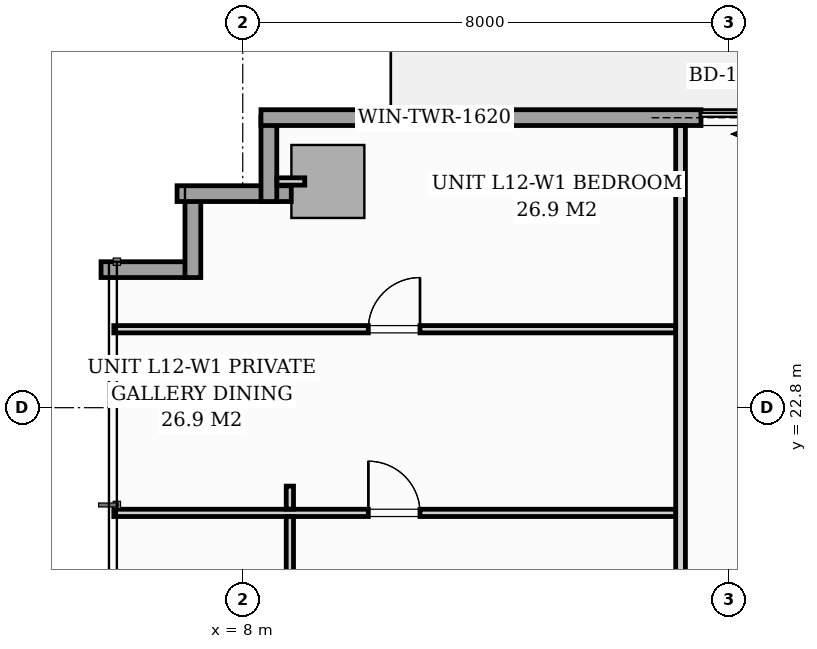
"""IFC4 building model, lengths in metres.
Left out: names, types, materials, properties, quantities, classifications, styles, units other than length and angle.
Written with IfcOpenShell. Run it as: python <this file> out.ifc"""

import sys

from ifc_helpers import new_model, si_unit, direction, frame, frame_2d, origin, origin_2d, place, context, subcontext, project, spatial, rectangle, extrude, source, transform, mapped, element, fill, save


model = new_model("IFC4")
c1 = context("Model", 3, precision=1e-05, world=origin(), true_north=direction((0.0, 1.0)))
c2 = subcontext(c1, "Body", "Model", "MODEL_VIEW")
j1 = project(units=[si_unit("LENGTHUNIT", "METRE"), si_unit("PLANEANGLEUNIT", "RADIAN")], contexts=[c1])
p1 = place(None, origin())
s1 = spatial("IfcSite", under=j1, at=p1, CompositionType="ELEMENT")
p2 = place(p1, origin())
s2 = spatial("IfcBuilding", under=s1, at=p2, CompositionType="ELEMENT")
p3 = place(p2, frame((0.0, 0.0, 45.4)))
s3 = spatial("IfcBuildingStorey", under=s2, at=p3, CompositionType="ELEMENT", Elevation=45.4)
m1 = source(origin(), c2, "Body", "SweptSolid", [
    extrude(rectangle(XDim=1.2, YDim=1.2, at=origin_2d()), origin(), (0.0, 0.0, 1.0), 3.196),
])
p4 = place(p3, frame((9.4, 26.52, 0.002), z_axis=(0.0, 0.0, 1.0), x_axis=(1.0, 0.0, 0.0)))
e1 = element("IfcColumn", 1, at=p4, inside=s3, PredefinedType="COLUMN", context=c2, shape_type="MappedRepresentation", body=[
    mapped(m1, transform((0.0, 0.0, 0.0), scale=1.0)),
])
for number, where, z_axis, x_axis in (
    (2, (5.67, 25.07, 0.0), (0.0, 0.0, 1.0), (1.0, 0.0, 0.0)),
    (3, (7.18, 24.94, 0.0), (0.0, 0.0, 1.0), (0.0, 1.0, 0.0)),
):
    element("IfcWall", number, at=place(p3, frame(where, z_axis=z_axis, x_axis=x_axis)), inside=s3, PredefinedType="STANDARD", context=c2, shape_type="SweptSolid", body=[
        extrude(rectangle(XDim=1.395, YDim=0.26, at=frame_2d((0.698, 0.0))), origin(), (0.0, 0.0, 1.0), 2.94),
    ])
p5 = place(p3, frame((6.92, 26.32, 0.0), z_axis=(0.0, 0.0, 1.0), x_axis=(1.0, 0.0, 0.0)))
e4 = element("IfcWall", 4, at=p5, inside=s3, PredefinedType="STANDARD", context=c2, shape_type="SweptSolid", body=[
    extrude(rectangle(XDim=1.878, YDim=0.26, at=frame_2d((0.939, 0.0))), origin(), (0.0, 0.0, 1.0), 2.94),
])
p6 = place(p3, frame((8.43, 26.19, 0.0), z_axis=(0.0, 0.0, 1.0), x_axis=(0.0, 1.0, 0.0)))
e5 = element("IfcWall", 5, at=p6, inside=s3, PredefinedType="STANDARD", context=c2, shape_type="SweptSolid", body=[
    extrude(rectangle(XDim=1.395, YDim=0.26, at=frame_2d((0.698, 0.0))), origin(), (0.0, 0.0, 1.0), 2.94),
])
p7 = place(p3, frame((8.3, 27.57, 0.0), z_axis=(0.0, 0.0, 1.0), x_axis=(1.0, 0.0, 0.0)))
e6 = element("IfcWall", 6, at=p7, inside=s3, PredefinedType="STANDARD", context=c2, shape_type="SweptSolid", body=[
    extrude(rectangle(XDim=17.15, YDim=0.26, at=frame_2d((8.575, 0.0))), origin(), (0.0, 0.0, 1.0), 2.94),
])
p8 = place(p7, frame((7.236, 0.0, 0.0)))
e7 = element("IfcOpeningElement", 7, at=p8, cuts=e6, PredefinedType="OPENING", context=c2, shape_type="SweptSolid", body=[
    extrude(rectangle(XDim=1.8, YDim=2.06, at=frame_2d((0.9, 1.03))), frame((0.0, 0.14, 0.0), z_axis=(0.0, -1.0, 0.0), x_axis=(1.0, 0.0, 0.0)), (0.0, 0.0, 1.0), 0.28),
])
p9 = place(p7, frame((2.05, 0.0, 0.65)))
e8 = element("IfcOpeningElement", 8, at=p9, cuts=e6, PredefinedType="OPENING", context=c2, shape_type="SweptSolid", body=[
    extrude(rectangle(XDim=1.6, YDim=1.5, at=frame_2d((0.8, 0.75))), frame((0.0, 0.14, 0.0), z_axis=(0.0, -1.0, 0.0), x_axis=(1.0, 0.0, 0.0)), (0.0, 0.0, 1.0), 0.28),
])
p10 = place(p3, frame((15.2, 12.712, 0.0), z_axis=(0.0, 0.0, 1.0), x_axis=(0.0, 1.0, 0.0)))
e9 = element("IfcWall", 9, at=p10, inside=s3, PredefinedType="PARTITIONING", context=c2, shape_type="SweptSolid", body=[
    extrude(rectangle(XDim=14.726, YDim=0.16, at=frame_2d((7.363, 0.0))), origin(), (0.0, 0.0, 1.0), 2.94),
])
p11 = place(p10, frame((0.312, 0.0, 0.0)))
e10 = element("IfcOpeningElement", 10, at=p11, cuts=e9, PredefinedType="OPENING", context=c2, shape_type="SweptSolid", body=[
    extrude(rectangle(XDim=0.95, YDim=2.06, at=frame_2d((0.475, 1.03))), frame((0.0, 0.09, 0.0), z_axis=(0.0, -1.0, 0.0), x_axis=(1.0, 0.0, 0.0)), (0.0, 0.0, 1.0), 0.18),
])
p12 = place(p3, frame((5.88, 24.09, 0.0), z_axis=(0.0, 0.0, 1.0), x_axis=(1.0, 0.0, 0.0)))
e11 = element("IfcWall", 11, at=p12, inside=s3, PredefinedType="PARTITIONING", context=c2, shape_type="SweptSolid", body=[
    extrude(rectangle(XDim=9.238, YDim=0.12, at=frame_2d((4.619, 0.0))), origin(), (0.0, 0.0, 1.0), 2.94),
])
p13 = place(p12, frame((4.185, 0.0, 0.0)))
e12 = element("IfcOpeningElement", 12, at=p13, cuts=e11, PredefinedType="OPENING", context=c2, shape_type="SweptSolid", body=[
    extrude(rectangle(XDim=0.85, YDim=2.05, at=frame_2d((0.425, 1.025))), frame((0.0, 0.07, 0.0), z_axis=(0.0, -1.0, 0.0), x_axis=(1.0, 0.0, 0.0)), (0.0, 0.0, 1.0), 0.14),
])
p14 = place(p3, frame((5.88, 21.07, 0.0), z_axis=(0.0, 0.0, 1.0), x_axis=(1.0, 0.0, 0.0)))
e13 = element("IfcWall", 13, at=p14, inside=s3, PredefinedType="PARTITIONING", context=c2, shape_type="SweptSolid", body=[
    extrude(rectangle(XDim=9.238, YDim=0.12, at=frame_2d((4.619, 0.0))), origin(), (0.0, 0.0, 1.0), 2.94),
])
p15 = place(p14, frame((4.185, 0.0, 0.0)))
e14 = element("IfcOpeningElement", 14, at=p15, cuts=e13, PredefinedType="OPENING", context=c2, shape_type="SweptSolid", body=[
    extrude(rectangle(XDim=0.85, YDim=2.05, at=frame_2d((0.425, 1.025))), frame((0.0, 0.07, 0.0), z_axis=(0.0, -1.0, 0.0), x_axis=(1.0, 0.0, 0.0)), (0.0, 0.0, 1.0), 0.14),
])
p16 = place(p3, frame((8.775, 10.178, 0.0), z_axis=(0.0, 0.0, 1.0), x_axis=(0.0, 1.0, 0.0)))
e15 = element("IfcWall", 15, at=p16, inside=s3, PredefinedType="PARTITIONING", context=c2, shape_type="SweptSolid", body=[
    extrude(rectangle(XDim=10.83, YDim=0.12, at=frame_2d((5.415, 0.0))), origin(), (0.0, 0.0, 1.0), 2.94),
])
p17 = place(p16, frame((5.86, 0.0, 0.0)))
e16 = element("IfcOpeningElement", 16, at=p17, cuts=e15, PredefinedType="OPENING", context=c2, shape_type="SweptSolid", body=[
    extrude(rectangle(XDim=0.85, YDim=2.05, at=frame_2d((0.425, 1.025))), frame((0.0, 0.07, 0.0), z_axis=(0.0, -1.0, 0.0), x_axis=(1.0, 0.0, 0.0)), (0.0, 0.0, 1.0), 0.14),
])
p18 = place(p3, frame((8.775, 21.132, 0.0), z_axis=(0.0, 0.0, 1.0), x_axis=(0.0, 1.0, 0.0)))
e17 = element("IfcWall", 17, at=p18, inside=s3, PredefinedType="PARTITIONING", context=c2, shape_type="SweptSolid", body=[
    extrude(rectangle(XDim=0.378, YDim=0.12, at=frame_2d((0.189, 0.0))), origin(), (0.0, 0.0, 1.0), 2.94),
])
p19 = place(p3, frame((9.02, 26.52, 0.0), z_axis=(0.0, 0.0, 1.0), x_axis=(-1.0, 0.0, 0.0)))
e18 = element("IfcWall", 18, at=p19, inside=s3, PredefinedType="PARTITIONING", context=c2, shape_type="SweptSolid", body=[
    extrude(rectangle(XDim=0.458, YDim=0.12, at=frame_2d((0.229, 0.0))), origin(), (0.0, 0.0, 1.0), 2.94),
])
m2 = source(origin(), c2, "Body", "SweptSolid", [
    extrude(rectangle(XDim=1.8, YDim=2.06, at=frame_2d((0.9, 1.03))), frame((0.0, 0.025, 0.0), z_axis=(0.0, -1.0, 0.0), x_axis=(1.0, 0.0, 0.0)), (0.0, 0.0, 1.0), 0.05),
])
p20 = place(p8, origin())
e19 = element("IfcDoor", 19, at=p20, inside=s3, OperationType="SLIDING_TO_LEFT", PredefinedType="DOOR", context=c2, shape_type="MappedRepresentation", body=[
    mapped(m2, transform((0.0, 0.0, 0.0), scale=1.0)),
])
fill(e7, e19)
m3 = source(origin(), c2, "Body", "SweptSolid", [
    extrude(rectangle(XDim=1.6, YDim=1.5, at=frame_2d((0.8, 0.75))), frame((0.0, 0.03, 0.0), z_axis=(0.0, -1.0, 0.0), x_axis=(1.0, 0.0, 0.0)), (0.0, 0.0, 1.0), 0.06),
])
p21 = place(p9, origin())
e20 = element("IfcWindow", 20, at=p21, inside=s3, PartitioningType="SINGLE_PANEL", PredefinedType="WINDOW", context=c2, shape_type="MappedRepresentation", body=[
    mapped(m3, transform((0.0, 0.0, 0.0), scale=1.0)),
])
fill(e8, e20)
m4 = source(origin(), c2, "Body", "SweptSolid", [
    extrude(rectangle(XDim=0.85, YDim=2.05, at=frame_2d((0.425, 1.025))), frame((0.0, 0.025, 0.0), z_axis=(0.0, -1.0, 0.0), x_axis=(1.0, 0.0, 0.0)), (0.0, 0.0, 1.0), 0.05),
])
p22 = place(p13, origin())
e21 = element("IfcDoor", 21, at=p22, inside=s3, OperationType="SINGLE_SWING_RIGHT", PredefinedType="DOOR", context=c2, shape_type="MappedRepresentation", body=[
    mapped(m4, transform((0.0, 0.0, 0.0), scale=1.0)),
])
fill(e12, e21)
p23 = place(p15, origin())
e22 = element("IfcDoor", 22, at=p23, inside=s3, OperationType="SINGLE_SWING_LEFT", PredefinedType="DOOR", context=c2, shape_type="MappedRepresentation", body=[
    mapped(m4, transform((0.0, 0.0, 0.0), scale=1.0)),
])
fill(e14, e22)
save(model, sys.argv[1])
